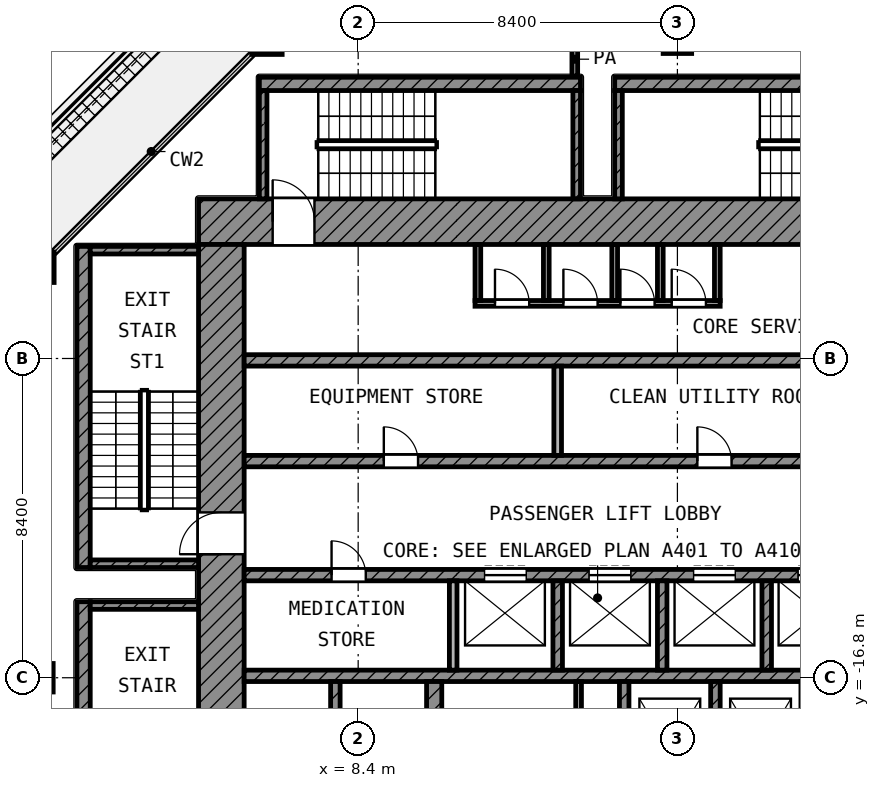
"""IFC4 building model, lengths in metres.
Left out: names, types, materials, properties, quantities, classifications, styles, units other than length and angle.
Written with IfcOpenShell. Run it as: python <this file> out.ifc"""

import sys

from ifc_helpers import new_model, si_unit, direction, frame, frame_2d, origin, origin_2d, place, context, subcontext, project, spatial, rectangle, extrude, element, fill, save


model = new_model("IFC4")
c1 = context("Model", 3, precision=1e-05, world=origin(), true_north=direction((0.0, 1.0)))
c2 = subcontext(c1, "Body", "Model", "MODEL_VIEW")
j1 = project(units=[si_unit("LENGTHUNIT", "METRE"), si_unit("PLANEANGLEUNIT", "RADIAN")], contexts=[c1])
p1 = place(None, origin())
s1 = spatial("IfcSite", under=j1, at=p1, CompositionType="ELEMENT")
p2 = place(p1, origin())
s2 = spatial("IfcBuilding", under=s1, at=p2, CompositionType="ELEMENT")
p3 = place(p2, frame((0.0, 0.0, 286.0)))
s3 = spatial("IfcBuildingStorey", under=s2, at=p3, CompositionType="ELEMENT", Elevation=286.0)
p4 = place(p3, frame((6.0, 0.0, 0.0), z_axis=(0.0, 0.0, 1.0), x_axis=(1.0, 0.0, 0.0)))
e1 = element("IfcColumn", 1, at=p4, inside=s3, PredefinedType="COLUMN", context=c2, shape_type="SweptSolid", body=[
    extrude(rectangle(XDim=0.8, YDim=0.8, at=origin_2d()), origin(), (0.0, 0.0, 1.0), 4.2),
])
p5 = place(p3, frame((16.8, 0.0, 0.0), z_axis=(0.0, 0.0, 1.0), x_axis=(1.0, 0.0, 0.0)))
e2 = element("IfcColumn", 2, at=p5, inside=s3, PredefinedType="COLUMN", context=c2, shape_type="SweptSolid", body=[
    extrude(rectangle(XDim=0.75, YDim=0.75, at=origin_2d()), origin(), (0.0, 0.0, 1.0), 4.2),
])
p6 = place(p3, frame((0.0, -6.0, 0.0), z_axis=(0.0, 0.0, 1.0), x_axis=(1.0, 0.0, 0.0)))
e3 = element("IfcColumn", 3, at=p6, inside=s3, PredefinedType="COLUMN", context=c2, shape_type="SweptSolid", body=[
    extrude(rectangle(XDim=0.8, YDim=0.8, at=origin_2d()), origin(), (0.0, 0.0, 1.0), 4.2),
])
p7 = place(p3, frame((0.0, -16.8, 0.0), z_axis=(0.0, 0.0, 1.0), x_axis=(1.0, 0.0, 0.0)))
e4 = element("IfcColumn", 4, at=p7, inside=s3, PredefinedType="COLUMN", context=c2, shape_type="SweptSolid", body=[
    extrude(rectangle(XDim=0.75, YDim=0.75, at=origin_2d()), origin(), (0.0, 0.0, 1.0), 4.2),
])
p8 = place(p3, frame((4.2, -4.8, 0.0), z_axis=(0.0, 0.0, 1.0), x_axis=(1.0, 0.0, 0.0)))
e5 = element("IfcWall", 5, at=p8, inside=s3, PredefinedType="SHEAR", context=c2, shape_type="SweptSolid", body=[
    extrude(rectangle(XDim=20.5, YDim=1.2, at=frame_2d((10.25, 0.0))), origin(), (0.0, 0.0, 1.0), 3.6),
])
p9 = place(p8, frame((1.95, 0.0, 0.0)))
e6 = element("IfcOpeningElement", 6, at=p9, cuts=e5, PredefinedType="OPENING", context=c2, shape_type="SweptSolid", body=[
    extrude(rectangle(XDim=1.1, YDim=2.1, at=frame_2d((0.55, 1.05))), frame((0.0, 0.61, 0.0), z_axis=(0.0, -1.0, 0.0), x_axis=(1.0, 0.0, 0.0)), (0.0, 0.0, 1.0), 1.22),
])
p10 = place(p8, frame((17.95, 0.0, 0.0)))
e7 = element("IfcOpeningElement", 7, at=p10, cuts=e5, PredefinedType="OPENING", context=c2, shape_type="SweptSolid", body=[
    extrude(rectangle(XDim=1.1, YDim=2.1, at=frame_2d((0.55, 1.05))), frame((0.0, 0.61, 0.0), z_axis=(0.0, -1.0, 0.0), x_axis=(1.0, 0.0, 0.0)), (0.0, 0.0, 1.0), 1.22),
])
p11 = place(p3, frame((4.8, -24.7, 0.0), z_axis=(0.0, 0.0, 1.0), x_axis=(0.0, 1.0, 0.0)))
e8 = element("IfcWall", 8, at=p11, inside=s3, PredefinedType="SHEAR", context=c2, shape_type="SweptSolid", body=[
    extrude(rectangle(XDim=19.3, YDim=1.2, at=frame_2d((9.65, 0.0))), origin(), (0.0, 0.0, 1.0), 3.6),
])
p12 = place(p11, frame((11.15, 0.0, 0.0)))
e9 = element("IfcOpeningElement", 9, at=p12, cuts=e8, PredefinedType="OPENING", context=c2, shape_type="SweptSolid", body=[
    extrude(rectangle(XDim=1.1, YDim=2.1, at=frame_2d((0.55, 1.05))), frame((0.0, 0.61, 0.0), z_axis=(0.0, -1.0, 0.0), x_axis=(1.0, 0.0, 0.0)), (0.0, 0.0, 1.0), 1.22),
])
p13 = place(p11, frame((1.85, 0.0, 0.0)))
e10 = element("IfcOpeningElement", 10, at=p13, cuts=e8, PredefinedType="OPENING", context=c2, shape_type="SweptSolid", body=[
    extrude(rectangle(XDim=1.1, YDim=2.1, at=frame_2d((0.55, 1.05))), frame((0.0, 0.61, 0.0), z_axis=(0.0, -1.0, 0.0), x_axis=(1.0, 0.0, 0.0)), (0.0, 0.0, 1.0), 1.22),
])
p14 = place(p3, frame((5.4, -8.45, 0.0), z_axis=(0.0, 0.0, 1.0), x_axis=(1.0, 0.0, 0.0)))
e11 = element("IfcWall", 11, at=p14, inside=s3, PredefinedType="SHEAR", context=c2, shape_type="SweptSolid", body=[
    extrude(rectangle(XDim=16.65, YDim=0.3, at=frame_2d((8.325, 0.0))), origin(), (0.0, 0.0, 1.0), 3.6),
])
p15 = place(p3, frame((5.4, -11.1, 0.0), z_axis=(0.0, 0.0, 1.0), x_axis=(1.0, 0.0, 0.0)))
e12 = element("IfcWall", 12, at=p15, inside=s3, PredefinedType="SHEAR", context=c2, shape_type="SweptSolid", body=[
    extrude(rectangle(XDim=16.65, YDim=0.3, at=frame_2d((8.325, 0.0))), origin(), (0.0, 0.0, 1.0), 3.6),
])
p16 = place(p15, frame((3.675, 0.0, 0.0)))
e13 = element("IfcOpeningElement", 13, at=p16, cuts=e12, PredefinedType="OPENING", context=c2, shape_type="SweptSolid", body=[
    extrude(rectangle(XDim=0.9, YDim=2.1, at=frame_2d((0.45, 1.05))), frame((0.0, 0.16, 0.0), z_axis=(0.0, -1.0, 0.0), x_axis=(1.0, 0.0, 0.0)), (0.0, 0.0, 1.0), 0.32),
])
p17 = place(p15, frame((11.925, 0.0, 0.0)))
e14 = element("IfcOpeningElement", 14, at=p17, cuts=e12, PredefinedType="OPENING", context=c2, shape_type="SweptSolid", body=[
    extrude(rectangle(XDim=0.9, YDim=2.1, at=frame_2d((0.45, 1.05))), frame((0.0, 0.16, 0.0), z_axis=(0.0, -1.0, 0.0), x_axis=(1.0, 0.0, 0.0)), (0.0, 0.0, 1.0), 0.32),
])
p18 = place(p3, frame((5.4, -14.1, 0.0), z_axis=(0.0, 0.0, 1.0), x_axis=(1.0, 0.0, 0.0)))
e15 = element("IfcWall", 15, at=p18, inside=s3, PredefinedType="SHEAR", context=c2, shape_type="SweptSolid", body=[
    extrude(rectangle(XDim=16.65, YDim=0.3, at=frame_2d((8.325, 0.0))), origin(), (0.0, 0.0, 1.0), 3.6),
])
p19 = place(p18, frame((6.325, 0.0, 0.0)))
e16 = element("IfcOpeningElement", 16, at=p19, cuts=e15, PredefinedType="OPENING", context=c2, shape_type="SweptSolid", body=[
    extrude(rectangle(XDim=1.1, YDim=2.1, at=frame_2d((0.55, 1.05))), frame((0.0, 0.16, 0.0), z_axis=(0.0, -1.0, 0.0), x_axis=(1.0, 0.0, 0.0)), (0.0, 0.0, 1.0), 0.32),
])
p20 = place(p18, frame((9.075, 0.0, 0.0)))
e17 = element("IfcOpeningElement", 17, at=p20, cuts=e15, PredefinedType="OPENING", context=c2, shape_type="SweptSolid", body=[
    extrude(rectangle(XDim=1.1, YDim=2.1, at=frame_2d((0.55, 1.05))), frame((0.0, 0.16, 0.0), z_axis=(0.0, -1.0, 0.0), x_axis=(1.0, 0.0, 0.0)), (0.0, 0.0, 1.0), 0.32),
])
p21 = place(p18, frame((11.825, 0.0, 0.0)))
e18 = element("IfcOpeningElement", 18, at=p21, cuts=e15, PredefinedType="OPENING", context=c2, shape_type="SweptSolid", body=[
    extrude(rectangle(XDim=1.1, YDim=2.1, at=frame_2d((0.55, 1.05))), frame((0.0, 0.16, 0.0), z_axis=(0.0, -1.0, 0.0), x_axis=(1.0, 0.0, 0.0)), (0.0, 0.0, 1.0), 0.32),
])
p22 = place(p18, frame((14.575, 0.0, 0.0)))
e19 = element("IfcOpeningElement", 19, at=p22, cuts=e15, PredefinedType="OPENING", context=c2, shape_type="SweptSolid", body=[
    extrude(rectangle(XDim=1.1, YDim=2.1, at=frame_2d((0.55, 1.05))), frame((0.0, 0.16, 0.0), z_axis=(0.0, -1.0, 0.0), x_axis=(1.0, 0.0, 0.0)), (0.0, 0.0, 1.0), 0.32),
])
p23 = place(p18, frame((2.3, 0.0, 0.0)))
e20 = element("IfcOpeningElement", 20, at=p23, cuts=e15, PredefinedType="OPENING", context=c2, shape_type="SweptSolid", body=[
    extrude(rectangle(XDim=0.9, YDim=2.1, at=frame_2d((0.45, 1.05))), frame((0.0, 0.16, 0.0), z_axis=(0.0, -1.0, 0.0), x_axis=(1.0, 0.0, 0.0)), (0.0, 0.0, 1.0), 0.32),
])
p24 = place(p3, frame((5.4, -16.75, 0.0), z_axis=(0.0, 0.0, 1.0), x_axis=(1.0, 0.0, 0.0)))
e21 = element("IfcWall", 21, at=p24, inside=s3, PredefinedType="SHEAR", context=c2, shape_type="SweptSolid", body=[
    extrude(rectangle(XDim=16.65, YDim=0.3, at=frame_2d((8.325, 0.0))), origin(), (0.0, 0.0, 1.0), 3.6),
])
p25 = place(p3, frame((10.4, -20.05, 0.0), z_axis=(0.0, 0.0, 1.0), x_axis=(0.0, 1.0, 0.0)))
e22 = element("IfcWall", 22, at=p25, inside=s3, PredefinedType="SHEAR", context=c2, shape_type="SweptSolid", body=[
    extrude(rectangle(XDim=3.15, YDim=0.4, at=frame_2d((1.575, 0.0))), origin(), (0.0, 0.0, 1.0), 3.6),
])
for number, where, z_axis, x_axis in (
    (23, (7.8, -20.05, 0.0), (0.0, 0.0, 1.0), (0.0, 1.0, 0.0)),
    (24, (15.4, -20.05, 0.0), (0.0, 0.0, 1.0), (0.0, 1.0, 0.0)),
    (25, (17.8, -20.05, 0.0), (0.0, 0.0, 1.0), (0.0, 1.0, 0.0)),
):
    element("IfcWall", number, at=place(p3, frame(where, z_axis=z_axis, x_axis=x_axis)), inside=s3, PredefinedType="SHEAR", context=c2, shape_type="SweptSolid", body=[
        extrude(rectangle(XDim=3.15, YDim=0.25, at=frame_2d((1.575, 0.0))), origin(), (0.0, 0.0, 1.0), 3.6),
    ])
p26 = place(p3, frame((13.65, -10.95, 0.0), z_axis=(0.0, 0.0, 1.0), x_axis=(0.0, 1.0, 0.0)))
e26 = element("IfcWall", 26, at=p26, inside=s3, PredefinedType="PARTITIONING", context=c2, shape_type="SweptSolid", body=[
    extrude(rectangle(XDim=2.35, YDim=0.2, at=frame_2d((1.175, 0.0))), origin(), (0.0, 0.0, 1.0), 3.6),
])
p27 = place(p3, frame((10.9, -16.6, 0.0), z_axis=(0.0, 0.0, 1.0), x_axis=(0.0, 1.0, 0.0)))
e27 = element("IfcWall", 27, at=p27, inside=s3, PredefinedType="PARTITIONING", context=c2, shape_type="SweptSolid", body=[
    extrude(rectangle(XDim=2.35, YDim=0.2, at=frame_2d((1.175, 0.0))), origin(), (0.0, 0.0, 1.0), 3.6),
])
for number, where, z_axis, x_axis in (
    (28, (13.65, -16.6, 0.0), (0.0, 0.0, 1.0), (0.0, 1.0, 0.0)),
    (29, (16.4, -16.6, 0.0), (0.0, 0.0, 1.0), (0.0, 1.0, 0.0)),
    (30, (19.15, -16.6, 0.0), (0.0, 0.0, 1.0), (0.0, 1.0, 0.0)),
):
    element("IfcWall", number, at=place(p3, frame(where, z_axis=z_axis, x_axis=x_axis)), inside=s3, PredefinedType="SHEAR", context=c2, shape_type="SweptSolid", body=[
        extrude(rectangle(XDim=2.35, YDim=0.25, at=frame_2d((1.175, 0.0))), origin(), (0.0, 0.0, 1.0), 3.6),
    ])
p28 = place(p3, frame((11.475, -6.95, 0.0), z_axis=(0.0, 0.0, 1.0), x_axis=(1.0, 0.0, 0.0)))
e31 = element("IfcWall", 31, at=p28, inside=s3, PredefinedType="PARTITIONING", context=c2, shape_type="SweptSolid", body=[
    extrude(rectangle(XDim=6.45, YDim=0.15, at=frame_2d((3.225, 0.0))), origin(), (0.0, 0.0, 1.0), 3.6),
])
p29 = place(p28, frame((0.525, 0.0, 0.0)))
e32 = element("IfcOpeningElement", 32, at=p29, cuts=e31, PredefinedType="OPENING", context=c2, shape_type="SweptSolid", body=[
    extrude(rectangle(XDim=0.9, YDim=2.1, at=frame_2d((0.45, 1.05))), frame((0.0, 0.085, 0.0), z_axis=(0.0, -1.0, 0.0), x_axis=(1.0, 0.0, 0.0)), (0.0, 0.0, 1.0), 0.17),
])
p30 = place(p28, frame((2.325, 0.0, 0.0)))
e33 = element("IfcOpeningElement", 33, at=p30, cuts=e31, PredefinedType="OPENING", context=c2, shape_type="SweptSolid", body=[
    extrude(rectangle(XDim=0.9, YDim=2.1, at=frame_2d((0.45, 1.05))), frame((0.0, 0.085, 0.0), z_axis=(0.0, -1.0, 0.0), x_axis=(1.0, 0.0, 0.0)), (0.0, 0.0, 1.0), 0.17),
])
p31 = place(p28, frame((3.825, 0.0, 0.0)))
e34 = element("IfcOpeningElement", 34, at=p31, cuts=e31, PredefinedType="OPENING", context=c2, shape_type="SweptSolid", body=[
    extrude(rectangle(XDim=0.9, YDim=2.1, at=frame_2d((0.45, 1.05))), frame((0.0, 0.085, 0.0), z_axis=(0.0, -1.0, 0.0), x_axis=(1.0, 0.0, 0.0)), (0.0, 0.0, 1.0), 0.17),
])
p32 = place(p28, frame((5.175, 0.0, 0.0)))
e35 = element("IfcOpeningElement", 35, at=p32, cuts=e31, PredefinedType="OPENING", context=c2, shape_type="SweptSolid", body=[
    extrude(rectangle(XDim=0.9, YDim=2.1, at=frame_2d((0.45, 1.05))), frame((0.0, 0.085, 0.0), z_axis=(0.0, -1.0, 0.0), x_axis=(1.0, 0.0, 0.0)), (0.0, 0.0, 1.0), 0.17),
])
for number, where, z_axis, x_axis in (
    (36, (11.55, -6.875, 0.0), (0.0, 0.0, 1.0), (0.0, 1.0, 0.0)),
    (37, (13.35, -6.875, 0.0), (0.0, 0.0, 1.0), (0.0, 1.0, 0.0)),
):
    element("IfcWall", number, at=place(p3, frame(where, z_axis=z_axis, x_axis=x_axis)), inside=s3, PredefinedType="PARTITIONING", context=c2, shape_type="SweptSolid", body=[
        extrude(rectangle(XDim=1.475, YDim=0.15, at=frame_2d((0.738, 0.0))), origin(), (0.0, 0.0, 1.0), 3.6),
    ])
p33 = place(p3, frame((14.2, -20.05, 0.0), z_axis=(0.0, 0.0, 1.0), x_axis=(0.0, 1.0, 0.0)))
e38 = element("IfcWall", 38, at=p33, inside=s3, PredefinedType="PARTITIONING", context=c2, shape_type="SweptSolid", body=[
    extrude(rectangle(XDim=3.15, YDim=0.15, at=frame_2d((1.575, 0.0))), origin(), (0.0, 0.0, 1.0), 3.6),
])
for number, where, z_axis, x_axis in (
    (39, (15.15, -6.875, 0.0), (0.0, 0.0, 1.0), (0.0, 1.0, 0.0)),
    (40, (16.35, -6.875, 0.0), (0.0, 0.0, 1.0), (0.0, 1.0, 0.0)),
    (41, (17.85, -6.875, 0.0), (0.0, 0.0, 1.0), (0.0, 1.0, 0.0)),
):
    element("IfcWall", number, at=place(p3, frame(where, z_axis=z_axis, x_axis=x_axis)), inside=s3, PredefinedType="PARTITIONING", context=c2, shape_type="SweptSolid", body=[
        extrude(rectangle(XDim=1.475, YDim=0.15, at=frame_2d((0.738, 0.0))), origin(), (0.0, 0.0, 1.0), 3.6),
    ])
p34 = place(p3, frame((1.175, -13.9, 0.0), z_axis=(0.0, 0.0, 1.0), x_axis=(0.0, 1.0, 0.0)))
e42 = element("IfcWall", 42, at=p34, inside=s3, PredefinedType="SHEAR", context=c2, shape_type="SweptSolid", body=[
    extrude(rectangle(XDim=8.45, YDim=0.35, at=frame_2d((4.225, 0.0))), origin(), (0.0, 0.0, 1.0), 3.6),
])
for number, where, z_axis, x_axis in (
    (43, (1.35, -5.55, 0.0), (0.0, 0.0, 1.0), (1.0, 0.0, 0.0)),
    (44, (1.35, -13.8, 0.0), (0.0, 0.0, 1.0), (1.0, 0.0, 0.0)),
):
    element("IfcWall", number, at=place(p3, frame(where, z_axis=z_axis, x_axis=x_axis)), inside=s3, PredefinedType="SHEAR", context=c2, shape_type="SweptSolid", body=[
        extrude(rectangle(XDim=2.85, YDim=0.2, at=frame_2d((1.425, 0.0))), origin(), (0.0, 0.0, 1.0), 3.6),
    ])
p35 = place(p3, frame((1.175, -23.25, 0.0), z_axis=(0.0, 0.0, 1.0), x_axis=(0.0, 1.0, 0.0)))
e45 = element("IfcWall", 45, at=p35, inside=s3, PredefinedType="SHEAR", context=c2, shape_type="SweptSolid", body=[
    extrude(rectangle(XDim=8.45, YDim=0.35, at=frame_2d((4.225, 0.0))), origin(), (0.0, 0.0, 1.0), 3.6),
])
p36 = place(p3, frame((1.35, -14.9, 0.0), z_axis=(0.0, 0.0, 1.0), x_axis=(1.0, 0.0, 0.0)))
e46 = element("IfcWall", 46, at=p36, inside=s3, PredefinedType="SHEAR", context=c2, shape_type="SweptSolid", body=[
    extrude(rectangle(XDim=2.85, YDim=0.2, at=frame_2d((1.425, 0.0))), origin(), (0.0, 0.0, 1.0), 3.6),
])
p37 = place(p3, frame((5.8, -1.175, 0.0), z_axis=(0.0, 0.0, 1.0), x_axis=(1.0, 0.0, 0.0)))
e47 = element("IfcWall", 47, at=p37, inside=s3, PredefinedType="SHEAR", context=c2, shape_type="SweptSolid", body=[
    extrude(rectangle(XDim=8.45, YDim=0.35, at=frame_2d((4.225, 0.0))), origin(), (0.0, 0.0, 1.0), 3.6),
])
for number, where, z_axis, x_axis in (
    (48, (5.9, -4.2, 0.0), (0.0, 0.0, 1.0), (0.0, 1.0, 0.0)),
    (49, (14.15, -4.2, 0.0), (0.0, 0.0, 1.0), (0.0, 1.0, 0.0)),
):
    element("IfcWall", number, at=place(p3, frame(where, z_axis=z_axis, x_axis=x_axis)), inside=s3, PredefinedType="SHEAR", context=c2, shape_type="SweptSolid", body=[
        extrude(rectangle(XDim=2.85, YDim=0.2, at=frame_2d((1.425, 0.0))), origin(), (0.0, 0.0, 1.0), 3.6),
    ])
p38 = place(p3, frame((15.15, -1.175, 0.0), z_axis=(0.0, 0.0, 1.0), x_axis=(1.0, 0.0, 0.0)))
e50 = element("IfcWall", 50, at=p38, inside=s3, PredefinedType="SHEAR", context=c2, shape_type="SweptSolid", body=[
    extrude(rectangle(XDim=8.45, YDim=0.35, at=frame_2d((4.225, 0.0))), origin(), (0.0, 0.0, 1.0), 3.6),
])
p39 = place(p3, frame((15.25, -4.2, 0.0), z_axis=(0.0, 0.0, 1.0), x_axis=(0.0, 1.0, 0.0)))
e51 = element("IfcWall", 51, at=p39, inside=s3, PredefinedType="SHEAR", context=c2, shape_type="SweptSolid", body=[
    extrude(rectangle(XDim=2.85, YDim=0.2, at=frame_2d((1.425, 0.0))), origin(), (0.0, 0.0, 1.0), 3.6),
])
p40 = place(p3, frame((14.1, -0.97, 0.0), z_axis=(0.0, 0.0, 1.0), x_axis=(0.0, 1.0, 0.0)))
e52 = element("IfcWall", 52, at=p40, inside=s3, PredefinedType="PARTITIONING", context=c2, shape_type="SweptSolid", body=[
    extrude(rectangle(XDim=0.89, YDim=0.15, at=frame_2d((0.445, 0.0))), origin(), (0.0, 0.0, 1.0), 3.6),
])
p41 = place(p19, origin())
e53 = element("IfcDoor", 53, at=p41, inside=s3, OperationType="DOUBLE_DOOR_SLIDING", PredefinedType="DOOR", context=c2, shape_type="SweptSolid", body=[
    extrude(rectangle(XDim=1.1, YDim=2.1, at=frame_2d((0.55, 1.05))), frame((0.0, 0.025, 0.0), z_axis=(0.0, -1.0, 0.0), x_axis=(1.0, 0.0, 0.0)), (0.0, 0.0, 1.0), 0.05),
])
fill(e16, e53)
p42 = place(p20, origin())
e54 = element("IfcDoor", 54, at=p42, inside=s3, OperationType="DOUBLE_DOOR_SLIDING", PredefinedType="DOOR", context=c2, shape_type="SweptSolid", body=[
    extrude(rectangle(XDim=1.1, YDim=2.1, at=frame_2d((0.55, 1.05))), frame((0.0, 0.025, 0.0), z_axis=(0.0, -1.0, 0.0), x_axis=(1.0, 0.0, 0.0)), (0.0, 0.0, 1.0), 0.05),
])
fill(e17, e54)
p43 = place(p21, origin())
e55 = element("IfcDoor", 55, at=p43, inside=s3, OperationType="DOUBLE_DOOR_SLIDING", PredefinedType="DOOR", context=c2, shape_type="SweptSolid", body=[
    extrude(rectangle(XDim=1.1, YDim=2.1, at=frame_2d((0.55, 1.05))), frame((0.0, 0.025, 0.0), z_axis=(0.0, -1.0, 0.0), x_axis=(1.0, 0.0, 0.0)), (0.0, 0.0, 1.0), 0.05),
])
fill(e18, e55)
p44 = place(p22, origin())
e56 = element("IfcDoor", 56, at=p44, inside=s3, OperationType="DOUBLE_DOOR_SLIDING", PredefinedType="DOOR", context=c2, shape_type="SweptSolid", body=[
    extrude(rectangle(XDim=1.1, YDim=2.1, at=frame_2d((0.55, 1.05))), frame((0.0, 0.025, 0.0), z_axis=(0.0, -1.0, 0.0), x_axis=(1.0, 0.0, 0.0)), (0.0, 0.0, 1.0), 0.05),
])
fill(e19, e56)
p45 = place(p12, origin())
e57 = element("IfcDoor", 57, at=p45, inside=s3, OperationType="SINGLE_SWING_LEFT", PredefinedType="DOOR", context=c2, shape_type="SweptSolid", body=[
    extrude(rectangle(XDim=1.1, YDim=2.1, at=frame_2d((0.55, 1.05))), frame((0.0, 0.025, 0.0), z_axis=(0.0, -1.0, 0.0), x_axis=(1.0, 0.0, 0.0)), (0.0, 0.0, 1.0), 0.05),
])
fill(e9, e57)
p46 = place(p9, origin())
e58 = element("IfcDoor", 58, at=p46, inside=s3, OperationType="SINGLE_SWING_LEFT", PredefinedType="DOOR", context=c2, shape_type="SweptSolid", body=[
    extrude(rectangle(XDim=1.1, YDim=2.1, at=frame_2d((0.55, 1.05))), frame((0.0, 0.025, 0.0), z_axis=(0.0, -1.0, 0.0), x_axis=(1.0, 0.0, 0.0)), (0.0, 0.0, 1.0), 0.05),
])
fill(e6, e58)
p47 = place(p29, origin())
e59 = element("IfcDoor", 59, at=p47, inside=s3, OperationType="SINGLE_SWING_LEFT", PredefinedType="DOOR", context=c2, shape_type="SweptSolid", body=[
    extrude(rectangle(XDim=0.9, YDim=2.1, at=frame_2d((0.45, 1.05))), frame((0.0, 0.025, 0.0), z_axis=(0.0, -1.0, 0.0), x_axis=(1.0, 0.0, 0.0)), (0.0, 0.0, 1.0), 0.05),
])
fill(e32, e59)
p48 = place(p30, origin())
e60 = element("IfcDoor", 60, at=p48, inside=s3, OperationType="SINGLE_SWING_LEFT", PredefinedType="DOOR", context=c2, shape_type="SweptSolid", body=[
    extrude(rectangle(XDim=0.9, YDim=2.1, at=frame_2d((0.45, 1.05))), frame((0.0, 0.025, 0.0), z_axis=(0.0, -1.0, 0.0), x_axis=(1.0, 0.0, 0.0)), (0.0, 0.0, 1.0), 0.05),
])
fill(e33, e60)
p49 = place(p31, origin())
e61 = element("IfcDoor", 61, at=p49, inside=s3, OperationType="SINGLE_SWING_LEFT", PredefinedType="DOOR", context=c2, shape_type="SweptSolid", body=[
    extrude(rectangle(XDim=0.9, YDim=2.1, at=frame_2d((0.45, 1.05))), frame((0.0, 0.025, 0.0), z_axis=(0.0, -1.0, 0.0), x_axis=(1.0, 0.0, 0.0)), (0.0, 0.0, 1.0), 0.05),
])
fill(e34, e61)
p50 = place(p32, origin())
e62 = element("IfcDoor", 62, at=p50, inside=s3, OperationType="SINGLE_SWING_LEFT", PredefinedType="DOOR", context=c2, shape_type="SweptSolid", body=[
    extrude(rectangle(XDim=0.9, YDim=2.1, at=frame_2d((0.45, 1.05))), frame((0.0, 0.025, 0.0), z_axis=(0.0, -1.0, 0.0), x_axis=(1.0, 0.0, 0.0)), (0.0, 0.0, 1.0), 0.05),
])
fill(e35, e62)
p51 = place(p16, origin())
e63 = element("IfcDoor", 63, at=p51, inside=s3, OperationType="SINGLE_SWING_LEFT", PredefinedType="DOOR", context=c2, shape_type="SweptSolid", body=[
    extrude(rectangle(XDim=0.9, YDim=2.1, at=frame_2d((0.45, 1.05))), frame((0.0, 0.025, 0.0), z_axis=(0.0, -1.0, 0.0), x_axis=(1.0, 0.0, 0.0)), (0.0, 0.0, 1.0), 0.05),
])
fill(e13, e63)
p52 = place(p17, origin())
e64 = element("IfcDoor", 64, at=p52, inside=s3, OperationType="SINGLE_SWING_LEFT", PredefinedType="DOOR", context=c2, shape_type="SweptSolid", body=[
    extrude(rectangle(XDim=0.9, YDim=2.1, at=frame_2d((0.45, 1.05))), frame((0.0, 0.025, 0.0), z_axis=(0.0, -1.0, 0.0), x_axis=(1.0, 0.0, 0.0)), (0.0, 0.0, 1.0), 0.05),
])
fill(e14, e64)
p53 = place(p23, origin())
e65 = element("IfcDoor", 65, at=p53, inside=s3, OperationType="SINGLE_SWING_LEFT", PredefinedType="DOOR", context=c2, shape_type="SweptSolid", body=[
    extrude(rectangle(XDim=0.9, YDim=2.1, at=frame_2d((0.45, 1.05))), frame((0.0, 0.025, 0.0), z_axis=(0.0, -1.0, 0.0), x_axis=(1.0, 0.0, 0.0)), (0.0, 0.0, 1.0), 0.05),
])
fill(e20, e65)
save(model, sys.argv[1])
